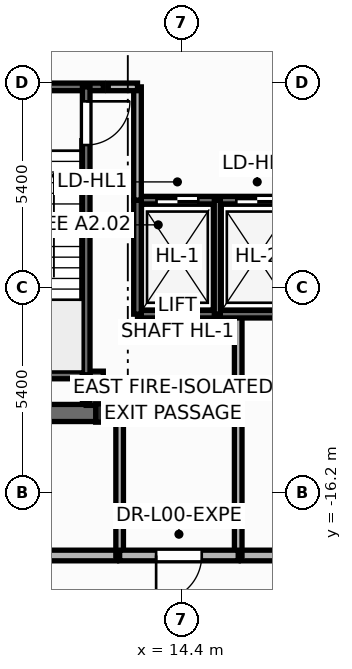
"""IFC4 building model, lengths in metres.
Left out: names, types, materials, properties, quantities, classifications, styles, units other than length and angle.
Written with IfcOpenShell. Run it as: python <this file> out.ifc"""

import sys

from ifc_helpers import new_model, si_unit, direction, frame, frame_2d, origin, origin_2d, place, context, subcontext, project, spatial, rectangle, i_section, extrude, element, fill, save


model = new_model("IFC4")
c1 = context("Model", 3, precision=1e-05, world=origin(), true_north=direction((0.0, 1.0)))
c2 = subcontext(c1, "Body", "Model", "MODEL_VIEW")
j1 = project(units=[si_unit("LENGTHUNIT", "METRE"), si_unit("PLANEANGLEUNIT", "RADIAN")], contexts=[c1])
p1 = place(None, origin())
s1 = spatial("IfcSite", under=j1, at=p1, CompositionType="ELEMENT")
p2 = place(p1, origin())
s2 = spatial("IfcBuilding", under=s1, at=p2, CompositionType="ELEMENT")
p3 = place(p2, origin())
s3 = spatial("IfcBuildingStorey", under=s2, at=p3, CompositionType="ELEMENT", Elevation=0.0)
p4 = place(p3, frame((12.4, -14.1, 0.0), z_axis=(0.0, 0.0, 1.0), x_axis=(1.0, 0.0, 0.0)))
e1 = element("IfcColumn", 1, at=p4, inside=s3, PredefinedType="COLUMN", context=c2, shape_type="SweptSolid", body=[
    extrude(i_section(OverallWidth=0.5, OverallDepth=0.482, WebThickness=0.04, FlangeThickness=0.045, at=origin_2d()), origin(), (0.0, 0.0, 1.0), 5.4),
])
p5 = place(p3, frame((12.7, -17.85, -0.015), z_axis=(0.0, 0.0, 1.0), x_axis=(-1.0, 0.0, 0.0)))
e2 = element("IfcWall", 2, at=p5, inside=s3, PredefinedType="STANDARD", context=c2, shape_type="SweptSolid", body=[
    extrude(rectangle(XDim=25.4, YDim=0.28, at=frame_2d((12.7, 0.0))), origin(), (0.0, 0.0, 1.0), 4.498),
])
p6 = place(p5, frame((2.97, 0.0, 0.015)))
e3 = element("IfcOpeningElement", 3, at=p6, cuts=e2, PredefinedType="OPENING", context=c2, shape_type="SweptSolid", body=[
    extrude(rectangle(XDim=2.006, YDim=2.304, at=frame_2d((1.0, 1.152))), frame((0.0, 0.15, 0.0), z_axis=(0.0, -1.0, 0.0), x_axis=(1.0, 0.0, 0.0)), (0.0, 0.0, 1.0), 0.3),
])
p7 = place(p3, frame((18.063, -17.85, -0.015), z_axis=(0.0, 0.0, 1.0), x_axis=(-1.0, 0.0, 0.0)))
e4 = element("IfcWall", 4, at=p7, inside=s3, PredefinedType="STANDARD", context=c2, shape_type="SweptSolid", body=[
    extrude(rectangle(XDim=2.083, YDim=0.28, at=frame_2d((1.042, 0.0))), origin(), (0.0, 0.0, 1.0), 5.135),
])
p8 = place(p3, frame((5.583, 11.29, -0.015), z_axis=(0.0, 0.0, 1.0), x_axis=(0.616945483616, -0.787005889588, 0.0)))
e5 = element("IfcWall", 5, at=p8, inside=s3, PredefinedType="STANDARD", context=c2, shape_type="SweptSolid", body=[
    extrude(rectangle(XDim=28.627, YDim=0.28, at=frame_2d((14.314, 0.0))), origin(), (0.0, 0.0, 1.0), 3.91),
])
p9 = place(p8, frame((2.979, 0.0, 0.015)))
e6 = element("IfcOpeningElement", 6, at=p9, cuts=e5, PredefinedType="OPENING", context=c2, shape_type="SweptSolid", body=[
    extrude(rectangle(XDim=1.206, YDim=2.154, at=frame_2d((0.6, 1.077))), frame((0.0, 0.15, 0.0), z_axis=(0.0, -1.0, 0.0), x_axis=(1.0, 0.0, 0.0)), (0.0, 0.0, 1.0), 0.3),
])
p10 = place(p3, frame((-12.75, -14.1, 0.0), z_axis=(0.0, 0.0, 1.0), x_axis=(1.0, 0.0, 0.0)))
e7 = element("IfcWall", 7, at=p10, inside=s3, PredefinedType="SHEAR", context=c2, shape_type="SweptSolid", body=[
    extrude(rectangle(XDim=25.5, YDim=0.45, at=frame_2d((12.75, 0.0))), origin(), (0.0, 0.0, 1.0), 5.4),
])
for number, where, z_axis, x_axis in (
    (8, (8.48, -5.52, 0.0), (0.0, 0.0, 1.0), (1.0, 0.0, 0.0)),
    (9, (8.48, -13.1, 0.0), (0.0, 0.0, 1.0), (1.0, 0.0, 0.0)),
):
    element("IfcWall", number, at=place(p3, frame(where, z_axis=z_axis, x_axis=x_axis)), inside=s3, PredefinedType="SOLIDWALL", context=c2, shape_type="SweptSolid", body=[
        extrude(rectangle(XDim=3.87, YDim=0.2, at=frame_2d((1.935, 0.0))), origin(), (0.0, 0.0, 1.0), 5.4),
    ])
p11 = place(p3, frame((11.9, -5.52, 0.0), z_axis=(0.0, 0.0, 1.0), x_axis=(0.0, -1.0, 0.0)))
e10 = element("IfcWall", 10, at=p11, inside=s3, PredefinedType="SOLIDWALL", context=c2, shape_type="SweptSolid", body=[
    extrude(rectangle(XDim=7.58, YDim=0.2, at=frame_2d((3.79, 0.0))), origin(), (0.0, 0.0, 1.0), 5.4),
])
p12 = place(p11, frame((0.38, 0.0, 0.0)))
e11 = element("IfcOpeningElement", 11, at=p12, cuts=e10, PredefinedType="OPENING", context=c2, shape_type="SweptSolid", body=[
    extrude(rectangle(XDim=1.156, YDim=2.154, at=frame_2d((0.575, 1.077))), frame((0.0, 0.11, 0.0), z_axis=(0.0, -1.0, 0.0), x_axis=(1.0, 0.0, 0.0)), (0.0, 0.0, 1.0), 0.22),
])
p13 = place(p3, frame((15.9, -17.85, 0.0), z_axis=(0.0, 0.0, 1.0), x_axis=(0.0, 1.0, 0.0)))
e12 = element("IfcWall", 12, at=p13, inside=s3, PredefinedType="SOLIDWALL", context=c2, shape_type="SweptSolid", body=[
    extrude(rectangle(XDim=6.35, YDim=0.2, at=frame_2d((3.175, 0.0))), origin(), (0.0, 0.0, 1.0), 5.12),
])
p14 = place(p3, frame((13.25, -11.5, 0.0), z_axis=(0.0, 0.0, 1.0), x_axis=(1.0, 0.0, 0.0)))
e13 = element("IfcWall", 13, at=p14, inside=s3, PredefinedType="SOLIDWALL", context=c2, shape_type="SweptSolid", body=[
    extrude(rectangle(XDim=4.2, YDim=0.2, at=frame_2d((2.1, 0.0))), origin(), (0.0, 0.0, 1.0), 5.4),
])
p15 = place(p3, frame((13.25, -8.5, 0.0), z_axis=(0.0, 0.0, 1.0), x_axis=(1.0, 0.0, 0.0)))
e14 = element("IfcWall", 14, at=p15, inside=s3, PredefinedType="SOLIDWALL", context=c2, shape_type="SweptSolid", body=[
    extrude(rectangle(XDim=4.2, YDim=0.2, at=frame_2d((2.1, 0.0))), origin(), (0.0, 0.0, 1.0), 5.4),
])
p16 = place(p15, frame((0.5, 0.0, 0.0)))
e15 = element("IfcOpeningElement", 15, at=p16, cuts=e14, PredefinedType="OPENING", context=c2, shape_type="SweptSolid", body=[
    extrude(rectangle(XDim=1.106, YDim=2.104, at=frame_2d((0.55, 1.052))), frame((0.0, 0.11, 0.0), z_axis=(0.0, -1.0, 0.0), x_axis=(1.0, 0.0, 0.0)), (0.0, 0.0, 1.0), 0.22),
])
p17 = place(p15, frame((2.6, 0.0, 0.0)))
e16 = element("IfcOpeningElement", 16, at=p17, cuts=e14, PredefinedType="OPENING", context=c2, shape_type="SweptSolid", body=[
    extrude(rectangle(XDim=1.106, YDim=2.104, at=frame_2d((0.55, 1.052))), frame((0.0, 0.11, 0.0), z_axis=(0.0, -1.0, 0.0), x_axis=(1.0, 0.0, 0.0)), (0.0, 0.0, 1.0), 0.22),
])
p18 = place(p3, frame((12.78, -17.85, 0.0), z_axis=(0.0, 0.0, 1.0), x_axis=(0.0, 1.0, 0.0)))
e17 = element("IfcWall", 17, at=p18, inside=s3, PredefinedType="SOLIDWALL", context=c2, shape_type="SweptSolid", body=[
    extrude(rectangle(XDim=4.05, YDim=0.2, at=frame_2d((2.025, 0.0))), origin(), (0.0, 0.0, 1.0), 5.12),
])
p19 = place(p3, frame((15.9, -17.85, 0.0), z_axis=(0.0, 0.0, 1.0), x_axis=(-1.0, 0.0, 0.0)))
e18 = element("IfcWall", 18, at=p19, inside=s3, PredefinedType="STANDARD", context=c2, shape_type="SweptSolid", body=[
    extrude(rectangle(XDim=3.12, YDim=0.28, at=frame_2d((1.56, 0.0))), origin(), (0.0, 0.0, 1.0), 5.12),
])
p20 = place(p19, frame((0.96, 0.0, 0.0)))
e19 = element("IfcOpeningElement", 19, at=p20, cuts=e18, PredefinedType="OPENING", context=c2, shape_type="SweptSolid", body=[
    extrude(rectangle(XDim=1.206, YDim=2.154, at=frame_2d((0.6, 1.077))), frame((0.0, 0.15, 0.0), z_axis=(0.0, -1.0, 0.0), x_axis=(1.0, 0.0, 0.0)), (0.0, 0.0, 1.0), 0.3),
])
p21 = place(p3, frame((13.25, -11.5, 0.0), z_axis=(0.0, 0.0, 1.0), x_axis=(0.0, 1.0, 0.0)))
e20 = element("IfcWall", 20, at=p21, inside=s3, PredefinedType="SOLIDWALL", context=c2, shape_type="SweptSolid", body=[
    extrude(rectangle(XDim=3.0, YDim=0.2, at=frame_2d((1.5, 0.0))), origin(), (0.0, 0.0, 1.0), 5.4),
])
p22 = place(p3, frame((15.35, -11.5, 0.0), z_axis=(0.0, 0.0, 1.0), x_axis=(0.0, 1.0, 0.0)))
e21 = element("IfcWall", 21, at=p22, inside=s3, PredefinedType="PARTITIONING", context=c2, shape_type="SweptSolid", body=[
    extrude(rectangle(XDim=3.0, YDim=0.16, at=frame_2d((1.5, 0.0))), origin(), (0.0, 0.0, 1.0), 5.12),
])
p23 = place(p3, frame((13.25, -8.5, 0.0), z_axis=(0.0, 0.0, 1.0), x_axis=(0.0, 1.0, 0.0)))
e22 = element("IfcWall", 22, at=p23, inside=s3, PredefinedType="SOLIDWALL", context=c2, shape_type="SweptSolid", body=[
    extrude(rectangle(XDim=2.98, YDim=0.2, at=frame_2d((1.49, 0.0))), origin(), (0.0, 0.0, 1.0), 5.12),
])
p24 = place(p3, frame((11.9, -13.8, 0.0), z_axis=(0.0, 0.0, 1.0), x_axis=(1.0, 0.0, 0.0)))
e23 = element("IfcWall", 23, at=p24, inside=s3, PredefinedType="SOLIDWALL", context=c2, shape_type="SweptSolid", body=[
    extrude(rectangle(XDim=0.88, YDim=0.2, at=frame_2d((0.44, 0.0))), origin(), (0.0, 0.0, 1.0), 4.483),
])
p25 = place(p3, frame((12.48, -5.52, 0.0), z_axis=(0.0, 0.0, 1.0), x_axis=(1.0, 0.0, 0.0)))
e24 = element("IfcWall", 24, at=p25, inside=s3, PredefinedType="SOLIDWALL", context=c2, shape_type="SweptSolid", body=[
    extrude(rectangle(XDim=0.77, YDim=0.2, at=frame_2d((0.385, 0.0))), origin(), (0.0, 0.0, 1.0), 4.483),
])
p26 = place(p3, frame((11.9, -13.8, 0.0), z_axis=(0.0, 0.0, 1.0), x_axis=(0.0, 1.0, 0.0)))
e25 = element("IfcWall", 25, at=p26, inside=s3, PredefinedType="SOLIDWALL", context=c2, shape_type="SweptSolid", body=[
    extrude(rectangle(XDim=0.7, YDim=0.2, at=frame_2d((0.35, 0.0))), origin(), (0.0, 0.0, 1.0), 5.12),
])
p27 = place(p12, origin())
e26 = element("IfcDoor", 26, at=p27, inside=s3, OperationType="SINGLE_SWING_LEFT", PredefinedType="DOOR", context=c2, shape_type="SweptSolid", body=[
    extrude(rectangle(XDim=1.15, YDim=2.15, at=frame_2d((0.575, 1.075))), frame((0.0, 0.025, 0.0), z_axis=(0.0, -1.0, 0.0), x_axis=(1.0, 0.0, 0.0)), (0.0, 0.0, 1.0), 0.05),
])
fill(e11, e26)
p28 = place(p16, origin())
e27 = element("IfcDoor", 27, at=p28, inside=s3, OperationType="DOUBLE_DOOR_SLIDING", PredefinedType="DOOR", context=c2, shape_type="SweptSolid", body=[
    extrude(rectangle(XDim=1.1, YDim=2.1, at=frame_2d((0.55, 1.05))), frame((0.0, 0.025, 0.0), z_axis=(0.0, -1.0, 0.0), x_axis=(1.0, 0.0, 0.0)), (0.0, 0.0, 1.0), 0.05),
])
fill(e15, e27)
p29 = place(p17, origin())
e28 = element("IfcDoor", 28, at=p29, inside=s3, OperationType="DOUBLE_DOOR_SLIDING", PredefinedType="DOOR", context=c2, shape_type="SweptSolid", body=[
    extrude(rectangle(XDim=1.1, YDim=2.1, at=frame_2d((0.55, 1.05))), frame((0.0, 0.025, 0.0), z_axis=(0.0, -1.0, 0.0), x_axis=(1.0, 0.0, 0.0)), (0.0, 0.0, 1.0), 0.05),
])
fill(e16, e28)
p30 = place(p20, origin())
e29 = element("IfcDoor", 29, at=p30, inside=s3, OperationType="SINGLE_SWING_RIGHT", PredefinedType="DOOR", context=c2, shape_type="SweptSolid", body=[
    extrude(rectangle(XDim=1.2, YDim=2.15, at=frame_2d((0.6, 1.075))), frame((0.0, 0.025, 0.0), z_axis=(0.0, -1.0, 0.0), x_axis=(1.0, 0.0, 0.0)), (0.0, 0.0, 1.0), 0.05),
])
fill(e19, e29)
save(model, sys.argv[1])
